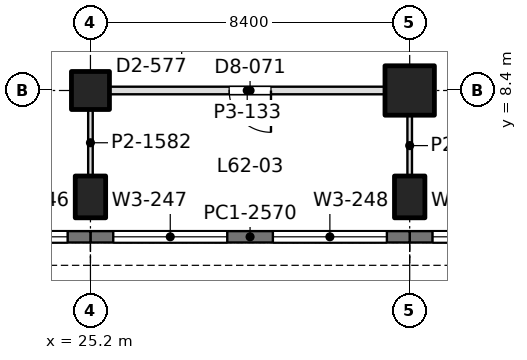
"""IFC4 building model, lengths in metres.
Left out: names, types, materials, properties, quantities, classifications, styles, units other than length and angle.
Written with IfcOpenShell. Run it as: python <this file> out.ifc"""

import sys

from ifc_helpers import new_model, si_unit, direction, frame, frame_2d, origin, origin_2d, place, context, subcontext, project, spatial, rectangle, extrude, element, fill, save


model = new_model("IFC4")
c1 = context("Model", 3, precision=1e-05, world=origin(), true_north=direction((0.0, 1.0)))
c2 = subcontext(c1, "Body", "Model", "MODEL_VIEW")
j1 = project(units=[si_unit("LENGTHUNIT", "METRE"), si_unit("PLANEANGLEUNIT", "RADIAN")], contexts=[c1])
p1 = place(None, origin())
s1 = spatial("IfcSite", under=j1, at=p1, CompositionType="ELEMENT")
p2 = place(p1, origin())
s2 = spatial("IfcBuilding", under=s1, at=p2, CompositionType="ELEMENT")
p3 = place(p2, frame((0.0, 0.0, 272.7)))
s3 = spatial("IfcBuildingStorey", under=s2, at=p3, CompositionType="ELEMENT", Elevation=272.7)
p4 = place(p3, frame((25.2, 5.6, 0.0), z_axis=(0.0, 0.0, 1.0), x_axis=(1.0, 0.0, 0.0)))
e1 = element("IfcColumn", 1, at=p4, inside=s3, PredefinedType="COLUMN", context=c2, shape_type="SweptSolid", body=[
    extrude(rectangle(XDim=0.8, YDim=1.1, at=origin_2d()), origin(), (0.0, 0.0, 1.0), 4.5),
])
p5 = place(p3, frame((25.2, 8.4, 0.0), z_axis=(0.0, 0.0, 1.0), x_axis=(1.0, 0.0, 0.0)))
e2 = element("IfcColumn", 2, at=p5, inside=s3, PredefinedType="COLUMN", context=c2, shape_type="SweptSolid", body=[
    extrude(rectangle(XDim=1.0, YDim=1.0, at=origin_2d()), origin(), (0.0, 0.0, 1.0), 4.5),
])
p6 = place(p3, frame((33.6, 5.6, 0.0), z_axis=(0.0, 0.0, 1.0), x_axis=(1.0, 0.0, 0.0)))
e3 = element("IfcColumn", 3, at=p6, inside=s3, PredefinedType="COLUMN", context=c2, shape_type="SweptSolid", body=[
    extrude(rectangle(XDim=0.8, YDim=1.1, at=origin_2d()), origin(), (0.0, 0.0, 1.0), 4.5),
])
p7 = place(p3, frame((33.6, 8.4, 0.0), z_axis=(0.0, 0.0, 1.0), x_axis=(1.0, 0.0, 0.0)))
e4 = element("IfcColumn", 4, at=p7, inside=s3, PredefinedType="COLUMN", context=c2, shape_type="SweptSolid", body=[
    extrude(rectangle(XDim=1.3, YDim=1.3, at=origin_2d()), origin(), (0.0, 0.0, 1.0), 4.5),
])
p8 = place(p3, frame((42.0, 4.55, 0.0), z_axis=(0.0, 0.0, 1.0), x_axis=(-1.0, 0.0, 0.0)))
e5 = element("IfcWall", 5, at=p8, inside=s3, PredefinedType="SOLIDWALL", context=c2, shape_type="SweptSolid", body=[
    extrude(rectangle(XDim=8.4, YDim=0.3, at=frame_2d((4.2, 0.0))), origin(), (0.0, 0.0, 1.0), 4.35),
])
p9 = place(p8, frame((0.6, 0.0, 0.9)))
e6 = element("IfcOpeningElement", 6, at=p9, cuts=e5, PredefinedType="OPENING", context=c2, shape_type="SweptSolid", body=[
    extrude(rectangle(XDim=3.0, YDim=2.4, at=frame_2d((1.5, 1.2))), frame((0.0, 0.16, 0.0), z_axis=(0.0, -1.0, 0.0), x_axis=(1.0, 0.0, 0.0)), (0.0, 0.0, 1.0), 0.32),
])
p10 = place(p8, frame((4.8, 0.0, 0.9)))
e7 = element("IfcOpeningElement", 7, at=p10, cuts=e5, PredefinedType="OPENING", context=c2, shape_type="SweptSolid", body=[
    extrude(rectangle(XDim=3.0, YDim=2.4, at=frame_2d((1.5, 1.2))), frame((0.0, 0.16, 0.0), z_axis=(0.0, -1.0, 0.0), x_axis=(1.0, 0.0, 0.0)), (0.0, 0.0, 1.0), 0.32),
])
p11 = place(p3, frame((33.6, 4.55, 0.0), z_axis=(0.0, 0.0, 1.0), x_axis=(-1.0, 0.0, 0.0)))
e8 = element("IfcWall", 8, at=p11, inside=s3, PredefinedType="SOLIDWALL", context=c2, shape_type="SweptSolid", body=[
    extrude(rectangle(XDim=8.4, YDim=0.3, at=frame_2d((4.2, 0.0))), origin(), (0.0, 0.0, 1.0), 4.35),
])
p12 = place(p11, frame((0.6, 0.0, 0.9)))
e9 = element("IfcOpeningElement", 9, at=p12, cuts=e8, PredefinedType="OPENING", context=c2, shape_type="SweptSolid", body=[
    extrude(rectangle(XDim=3.0, YDim=2.4, at=frame_2d((1.5, 1.2))), frame((0.0, 0.16, 0.0), z_axis=(0.0, -1.0, 0.0), x_axis=(1.0, 0.0, 0.0)), (0.0, 0.0, 1.0), 0.32),
])
p13 = place(p11, frame((4.8, 0.0, 0.9)))
e10 = element("IfcOpeningElement", 10, at=p13, cuts=e8, PredefinedType="OPENING", context=c2, shape_type="SweptSolid", body=[
    extrude(rectangle(XDim=3.0, YDim=2.4, at=frame_2d((1.5, 1.2))), frame((0.0, 0.16, 0.0), z_axis=(0.0, -1.0, 0.0), x_axis=(1.0, 0.0, 0.0)), (0.0, 0.0, 1.0), 0.32),
])
p14 = place(p3, frame((25.2, 4.55, 0.0), z_axis=(0.0, 0.0, 1.0), x_axis=(-1.0, 0.0, 0.0)))
e11 = element("IfcWall", 11, at=p14, inside=s3, PredefinedType="SOLIDWALL", context=c2, shape_type="SweptSolid", body=[
    extrude(rectangle(XDim=8.4, YDim=0.3, at=frame_2d((4.2, 0.0))), origin(), (0.0, 0.0, 1.0), 4.35),
])
p15 = place(p14, frame((0.6, 0.0, 0.9)))
e12 = element("IfcOpeningElement", 12, at=p15, cuts=e11, PredefinedType="OPENING", context=c2, shape_type="SweptSolid", body=[
    extrude(rectangle(XDim=3.0, YDim=2.4, at=frame_2d((1.5, 1.2))), frame((0.0, 0.16, 0.0), z_axis=(0.0, -1.0, 0.0), x_axis=(1.0, 0.0, 0.0)), (0.0, 0.0, 1.0), 0.32),
])
p16 = place(p14, frame((4.8, 0.0, 0.9)))
e13 = element("IfcOpeningElement", 13, at=p16, cuts=e11, PredefinedType="OPENING", context=c2, shape_type="SweptSolid", body=[
    extrude(rectangle(XDim=3.0, YDim=2.4, at=frame_2d((1.5, 1.2))), frame((0.0, 0.16, 0.0), z_axis=(0.0, -1.0, 0.0), x_axis=(1.0, 0.0, 0.0)), (0.0, 0.0, 1.0), 0.32),
])
p17 = place(p3, frame((25.699, 8.4, 0.0), z_axis=(0.0, 0.0, 1.0), x_axis=(1.0, 0.0, 0.0)))
e14 = element("IfcWall", 14, at=p17, inside=s3, PredefinedType="PARTITIONING", context=c2, shape_type="SweptSolid", body=[
    extrude(rectangle(XDim=7.252, YDim=0.2, at=frame_2d((3.626, 0.0))), origin(), (0.0, 0.0, 1.0), 3.8),
])
p18 = place(p17, frame((3.151, 0.0, 0.0)))
e15 = element("IfcOpeningElement", 15, at=p18, cuts=e14, PredefinedType="OPENING", context=c2, shape_type="SweptSolid", body=[
    extrude(rectangle(XDim=1.1, YDim=2.4, at=frame_2d((0.55, 1.2))), frame((0.0, 0.11, 0.0), z_axis=(0.0, -1.0, 0.0), x_axis=(1.0, 0.0, 0.0)), (0.0, 0.0, 1.0), 0.22),
])
p19 = place(p3, frame((25.2, 6.149, 0.0), z_axis=(0.0, 0.0, 1.0), x_axis=(0.0, 1.0, 0.0)))
e16 = element("IfcWall", 16, at=p19, inside=s3, PredefinedType="PARTITIONING", context=c2, shape_type="SweptSolid", body=[
    extrude(rectangle(XDim=1.752, YDim=0.12, at=frame_2d((0.876, 0.0))), origin(), (0.0, 0.0, 1.0), 3.99),
])
p20 = place(p3, frame((33.6, 6.149, 0.0), z_axis=(0.0, 0.0, 1.0), x_axis=(0.0, 1.0, 0.0)))
e17 = element("IfcWall", 17, at=p20, inside=s3, PredefinedType="PARTITIONING", context=c2, shape_type="SweptSolid", body=[
    extrude(rectangle(XDim=1.602, YDim=0.12, at=frame_2d((0.801, 0.0))), origin(), (0.0, 0.0, 1.0), 3.99),
])
p21 = place(p10, origin())
e18 = element("IfcWindow", 18, at=p21, inside=s3, PartitioningType="SINGLE_PANEL", PredefinedType="WINDOW", context=c2, shape_type="SweptSolid", body=[
    extrude(rectangle(XDim=3.0, YDim=2.4, at=frame_2d((1.5, 1.2))), frame((0.0, 0.03, 0.0), z_axis=(0.0, -1.0, 0.0), x_axis=(1.0, 0.0, 0.0)), (0.0, 0.0, 1.0), 0.06),
])
fill(e7, e18)
p22 = place(p12, origin())
e19 = element("IfcWindow", 19, at=p22, inside=s3, PartitioningType="SINGLE_PANEL", PredefinedType="WINDOW", context=c2, shape_type="SweptSolid", body=[
    extrude(rectangle(XDim=3.0, YDim=2.4, at=frame_2d((1.5, 1.2))), frame((0.0, 0.03, 0.0), z_axis=(0.0, -1.0, 0.0), x_axis=(1.0, 0.0, 0.0)), (0.0, 0.0, 1.0), 0.06),
])
fill(e9, e19)
p23 = place(p13, origin())
e20 = element("IfcWindow", 20, at=p23, inside=s3, PartitioningType="SINGLE_PANEL", PredefinedType="WINDOW", context=c2, shape_type="SweptSolid", body=[
    extrude(rectangle(XDim=3.0, YDim=2.4, at=frame_2d((1.5, 1.2))), frame((0.0, 0.03, 0.0), z_axis=(0.0, -1.0, 0.0), x_axis=(1.0, 0.0, 0.0)), (0.0, 0.0, 1.0), 0.06),
])
fill(e10, e20)
p24 = place(p15, origin())
e21 = element("IfcWindow", 21, at=p24, inside=s3, PartitioningType="SINGLE_PANEL", PredefinedType="WINDOW", context=c2, shape_type="SweptSolid", body=[
    extrude(rectangle(XDim=3.0, YDim=2.4, at=frame_2d((1.5, 1.2))), frame((0.0, 0.03, 0.0), z_axis=(0.0, -1.0, 0.0), x_axis=(1.0, 0.0, 0.0)), (0.0, 0.0, 1.0), 0.06),
])
fill(e12, e21)
p25 = place(p18, frame((1.1, 0.0, 0.0), z_axis=(0.0, 0.0, 1.0), x_axis=(-1.0, 0.0, 0.0)))
e22 = element("IfcDoor", 22, at=p25, inside=s3, OperationType="SINGLE_SWING_LEFT", PredefinedType="DOOR", context=c2, shape_type="SweptSolid", body=[
    extrude(rectangle(XDim=1.1, YDim=2.4, at=frame_2d((0.55, 1.2))), frame((0.0, 0.025, 0.0), z_axis=(0.0, -1.0, 0.0), x_axis=(1.0, 0.0, 0.0)), (0.0, 0.0, 1.0), 0.05),
])
fill(e15, e22)
save(model, sys.argv[1])
